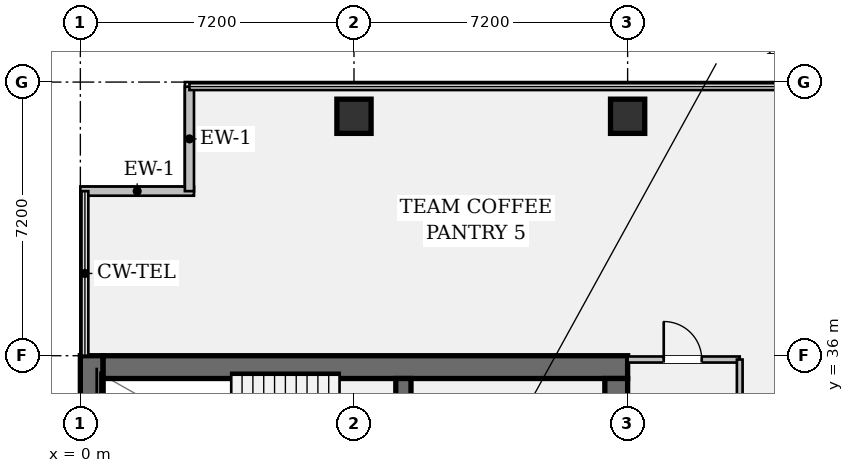
"""IFC4 building model, lengths in metres.
Left out: names, types, materials, properties, quantities, classifications, styles, units other than length and angle.
Written with IfcOpenShell. Run it as: python <this file> out.ifc"""

import sys

from ifc_helpers import new_model, si_unit, direction, frame, frame_2d, origin, origin_2d, place, context, subcontext, project, spatial, rectangle, hollow_rectangle, extrude, element, fill, save


model = new_model("IFC4")
c1 = context("Model", 3, precision=1e-05, world=origin(), true_north=direction((0.0, 1.0)))
c2 = subcontext(c1, "Body", "Model", "MODEL_VIEW")
j1 = project(units=[si_unit("LENGTHUNIT", "METRE"), si_unit("PLANEANGLEUNIT", "RADIAN")], contexts=[c1])
p1 = place(None, origin())
s1 = spatial("IfcSite", under=j1, at=p1, CompositionType="ELEMENT")
p2 = place(p1, origin())
s2 = spatial("IfcBuilding", under=s1, at=p2, CompositionType="ELEMENT")
p3 = place(p2, frame((0.0, 0.0, 117.6)))
s3 = spatial("IfcBuildingStorey", under=s2, at=p3, CompositionType="ELEMENT", Elevation=117.6)
p4 = place(p3, frame((0.3, 7.2, 0.0), z_axis=(0.0, 0.0, 1.0), x_axis=(0.0, 1.0, 0.0)))
e1 = element("IfcWall", 1, at=p4, inside=s3, PredefinedType="SHEAR", context=c2, shape_type="SweptSolid", body=[
    extrude(rectangle(XDim=28.8, YDim=0.6, at=frame_2d((14.4, 0.0))), origin(), (0.0, 0.0, 1.0), 3.58),
])
p5 = place(p3, frame((0.6, 35.7, 0.0), z_axis=(0.0, 0.0, 1.0), x_axis=(1.0, 0.0, 0.0)))
e2 = element("IfcWall", 2, at=p5, inside=s3, PredefinedType="SHEAR", context=c2, shape_type="SweptSolid", body=[
    extrude(rectangle(XDim=13.8, YDim=0.6, at=frame_2d((6.9, 0.0))), origin(), (0.0, 0.0, 1.0), 3.58),
])
p6 = place(p3, frame((14.1, 35.4, 0.0), z_axis=(0.0, 0.0, 1.0), x_axis=(0.0, -1.0, 0.0)))
e3 = element("IfcWall", 3, at=p6, inside=s3, PredefinedType="SHEAR", context=c2, shape_type="SweptSolid", body=[
    extrude(rectangle(XDim=27.6, YDim=0.6, at=frame_2d((13.8, 0.0))), origin(), (0.0, 0.0, 1.0), 3.58),
])
p7 = place(p6, frame((1.3, 0.0, 0.0)))
e4 = element("IfcOpeningElement", 4, at=p7, cuts=e3, PredefinedType="OPENING", context=c2, shape_type="SweptSolid", body=[
    extrude(rectangle(XDim=1.2, YDim=2.15, at=frame_2d((0.6, 1.075))), frame((0.0, 0.312, 0.0), z_axis=(0.0, -1.0, 0.0), x_axis=(1.0, 0.0, 0.0)), (0.0, 0.0, 1.0), 0.624),
])
p8 = place(p6, frame((25.25, 0.0, 0.0)))
e5 = element("IfcOpeningElement", 5, at=p8, cuts=e3, PredefinedType="OPENING", context=c2, shape_type="SweptSolid", body=[
    extrude(rectangle(XDim=1.2, YDim=2.15, at=frame_2d((0.6, 1.075))), frame((0.0, 0.312, 0.0), z_axis=(0.0, -1.0, 0.0), x_axis=(1.0, 0.0, 0.0)), (0.0, 0.0, 1.0), 0.624),
])
p9 = place(p6, frame((14.6, 0.0, 0.0)))
e6 = element("IfcOpeningElement", 6, at=p9, cuts=e3, PredefinedType="OPENING", context=c2, shape_type="SweptSolid", body=[
    extrude(rectangle(XDim=1.6, YDim=2.2, at=frame_2d((0.8, 1.1))), frame((0.0, 0.312, 0.0), z_axis=(0.0, -1.0, 0.0), x_axis=(1.0, 0.0, 0.0)), (0.0, 0.0, 1.0), 0.624),
])
p10 = place(p3, frame((8.5, 31.72, 0.0), z_axis=(0.0, 0.0, 1.0), x_axis=(0.0, 1.0, 0.0)))
e7 = element("IfcWall", 7, at=p10, inside=s3, PredefinedType="SHEAR", context=c2, shape_type="SweptSolid", body=[
    extrude(rectangle(XDim=3.68, YDim=0.4, at=frame_2d((1.84, 0.0))), origin(), (0.0, 0.0, 1.0), 3.58),
])
p11 = place(p10, frame((0.9, 0.0, 0.0)))
e8 = element("IfcOpeningElement", 8, at=p11, cuts=e7, PredefinedType="OPENING", context=c2, shape_type="SweptSolid", body=[
    extrude(rectangle(XDim=1.1, YDim=2.15, at=frame_2d((0.55, 1.075))), frame((0.0, 0.212, 0.0), z_axis=(0.0, -1.0, 0.0), x_axis=(1.0, 0.0, 0.0)), (0.0, 0.0, 1.0), 0.424),
])
for number, where, z_axis, x_axis in (
    (9, (7.2, 42.3, 0.0), (0.0, 0.0, 1.0), (1.0, 0.0, 0.0)),
    (10, (14.4, 42.3, 0.0), (0.0, 0.0, 1.0), (1.0, 0.0, 0.0)),
):
    element("IfcColumn", number, at=place(p3, frame(where, z_axis=z_axis, x_axis=x_axis)), inside=s3, PredefinedType="COLUMN", context=c2, shape_type="SweptSolid", body=[
        extrude(hollow_rectangle(XDim=0.9, YDim=0.9, WallThickness=0.055, at=origin_2d()), origin(), (0.0, 0.0, 1.0), 3.58),
    ])
p12 = place(p3, frame((0.0, 40.33, 0.0), z_axis=(0.0, 0.0, 1.0), x_axis=(1.0, 0.0, 0.0)))
e11 = element("IfcWall", 11, at=p12, inside=s3, PredefinedType="STANDARD", context=c2, shape_type="SweptSolid", body=[
    extrude(rectangle(XDim=2.99, YDim=0.24, at=frame_2d((1.495, 0.0))), origin(), (0.0, 0.0, 1.0), 3.58),
])
p13 = place(p3, frame((2.87, 40.33, 0.0), z_axis=(0.0, 0.0, 1.0), x_axis=(0.0, 1.0, 0.0)))
e12 = element("IfcWall", 12, at=p13, inside=s3, PredefinedType="STANDARD", context=c2, shape_type="SweptSolid", body=[
    extrude(rectangle(XDim=2.75, YDim=0.24, at=frame_2d((1.375, 0.0))), origin(), (0.0, 0.0, 1.0), 3.58),
])
p14 = place(p3, frame((14.4, 35.9, 0.0), z_axis=(0.0, 0.0, 1.0), x_axis=(1.0, 0.0, 0.0)))
e13 = element("IfcWall", 13, at=p14, inside=s3, PredefinedType="PARTITIONING", context=c2, shape_type="SweptSolid", body=[
    extrude(rectangle(XDim=2.95, YDim=0.16, at=frame_2d((1.475, 0.0))), origin(), (0.0, 0.0, 1.0), 2.869),
])
p15 = place(p14, frame((0.95, 0.0, 0.0)))
e14 = element("IfcOpeningElement", 14, at=p15, cuts=e13, PredefinedType="OPENING", context=c2, shape_type="SweptSolid", body=[
    extrude(rectangle(XDim=1.0, YDim=2.15, at=frame_2d((0.5, 1.075))), frame((0.0, 0.092, 0.0), z_axis=(0.0, -1.0, 0.0), x_axis=(1.0, 0.0, 0.0)), (0.0, 0.0, 1.0), 0.184),
])
p16 = place(p3, frame((17.35, 20.7, 0.0), z_axis=(0.0, 0.0, 1.0), x_axis=(0.0, 1.0, 0.0)))
e15 = element("IfcWall", 15, at=p16, inside=s3, PredefinedType="PARTITIONING", context=c2, shape_type="SweptSolid", body=[
    extrude(rectangle(XDim=15.2, YDim=0.15, at=frame_2d((7.6, 0.0))), origin(), (0.0, 0.0, 1.0), 2.869),
])
p17 = place(p16, frame((5.2, 0.0, 0.0)))
e16 = element("IfcOpeningElement", 16, at=p17, cuts=e15, PredefinedType="OPENING", context=c2, shape_type="SweptSolid", body=[
    extrude(rectangle(XDim=1.08, YDim=2.15, at=frame_2d((0.54, 1.075))), frame((0.0, 0.087, 0.0), z_axis=(0.0, -1.0, 0.0), x_axis=(1.0, 0.0, 0.0)), (0.0, 0.0, 1.0), 0.174),
])
p18 = place(p16, frame((10.6, 0.0, 0.0)))
e17 = element("IfcOpeningElement", 17, at=p18, cuts=e15, PredefinedType="OPENING", context=c2, shape_type="SweptSolid", body=[
    extrude(rectangle(XDim=1.0, YDim=2.15, at=frame_2d((0.5, 1.075))), frame((0.0, 0.087, 0.0), z_axis=(0.0, -1.0, 0.0), x_axis=(1.0, 0.0, 0.0)), (0.0, 0.0, 1.0), 0.174),
])
p19 = place(p15, origin())
e18 = element("IfcDoor", 18, at=p19, inside=s3, OperationType="SINGLE_SWING_LEFT", PredefinedType="DOOR", context=c2, shape_type="SweptSolid", body=[
    extrude(rectangle(XDim=1.0, YDim=2.15, at=frame_2d((0.5, 1.075))), frame((0.0, 0.025, 0.0), z_axis=(0.0, -1.0, 0.0), x_axis=(1.0, 0.0, 0.0)), (0.0, 0.0, 1.0), 0.05),
])
fill(e14, e18)
save(model, sys.argv[1])
